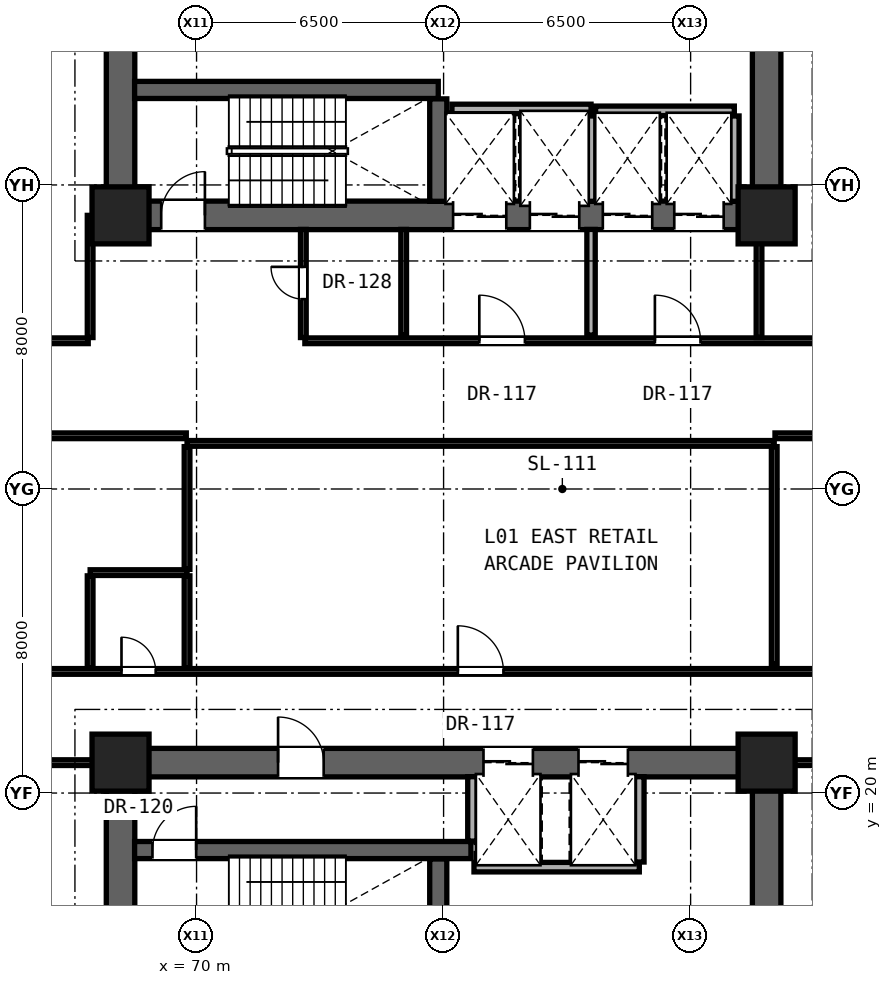
"""IFC4 building model, lengths in metres.
Left out: names, types, materials, properties, quantities, classifications, styles, units other than length and angle.
Written with IfcOpenShell. Run it as: python <this file> out.ifc"""

import sys

from ifc_helpers import new_model, si_unit, direction, frame, frame_2d, origin, origin_2d, place, context, subcontext, project, spatial, rectangle, extrude, element, fill, save


model = new_model("IFC4")
c1 = context("Model", 3, precision=1e-05, world=origin(), true_north=direction((0.0, 1.0)))
c2 = subcontext(c1, "Body", "Model", "MODEL_VIEW")
j1 = project(units=[si_unit("LENGTHUNIT", "METRE"), si_unit("PLANEANGLEUNIT", "RADIAN")], contexts=[c1])
p1 = place(None, origin())
s1 = spatial("IfcSite", under=j1, at=p1, CompositionType="ELEMENT")
p2 = place(p1, origin())
s2 = spatial("IfcBuilding", under=s1, at=p2, CompositionType="ELEMENT")
p3 = place(p2, frame((0.0, 0.0, 5.2)))
s3 = spatial("IfcBuildingStorey", under=s2, at=p3, CompositionType="ELEMENT", Elevation=5.2)
for number, where, z_axis, x_axis in (
    (1, (68.0, 20.8, 0.0), (0.0, 0.0, 1.0), (1.0, 0.0, 0.0)),
    (2, (85.0, 20.8, 0.0), (0.0, 0.0, 1.0), (1.0, 0.0, 0.0)),
    (3, (68.0, 35.2, 0.0), (0.0, 0.0, 1.0), (1.0, 0.0, 0.0)),
    (4, (85.0, 35.2, 0.0), (0.0, 0.0, 1.0), (1.0, 0.0, 0.0)),
):
    element("IfcColumn", number, at=place(p3, frame(where, z_axis=z_axis, x_axis=x_axis)), inside=s3, PredefinedType="COLUMN", context=c2, shape_type="SweptSolid", body=[
        extrude(rectangle(XDim=1.5, YDim=1.5, at=origin_2d()), origin(), (0.0, 0.0, 1.0), 4.3),
    ])
for number, where, z_axis, x_axis in (
    (5, (68.0, 35.2, 0.0), (0.0, 0.0, 1.0), (0.0, 1.0, 0.0)),
    (6, (85.0, 35.2, 0.0), (0.0, 0.0, 1.0), (0.0, 1.0, 0.0)),
):
    element("IfcWall", number, at=place(p3, frame(where, z_axis=z_axis, x_axis=x_axis)), inside=s3, PredefinedType="SHEAR", context=c2, shape_type="SweptSolid", body=[
        extrude(rectangle(XDim=5.6, YDim=0.75, at=frame_2d((2.8, 0.0))), origin(), (0.0, 0.0, 1.0), 3.98),
    ])
p4 = place(p3, frame((68.0, 35.2, 0.0), z_axis=(0.0, 0.0, 1.0), x_axis=(1.0, 0.0, 0.0)))
e7 = element("IfcWall", 7, at=p4, inside=s3, PredefinedType="SHEAR", context=c2, shape_type="SweptSolid", body=[
    extrude(rectangle(XDim=17.0, YDim=0.75, at=frame_2d((8.5, 0.0))), origin(), (0.0, 0.0, 1.0), 3.98),
])
p5 = place(p4, frame((1.07, 0.0, 0.0)))
e8 = element("IfcOpeningElement", 8, at=p5, cuts=e7, PredefinedType="OPENING", context=c2, shape_type="SweptSolid", body=[
    extrude(rectangle(XDim=1.15, YDim=2.2, at=frame_2d((0.575, 1.1))), frame((0.0, 0.385, 0.0), z_axis=(0.0, -1.0, 0.0), x_axis=(1.0, 0.0, 0.0)), (0.0, 0.0, 1.0), 0.77),
])
p6 = place(p4, frame((8.75, 0.0, 0.0)))
e9 = element("IfcOpeningElement", 9, at=p6, cuts=e7, PredefinedType="OPENING", context=c2, shape_type="SweptSolid", body=[
    extrude(rectangle(XDim=1.4, YDim=2.35, at=frame_2d((0.7, 1.175))), frame((0.0, 0.385, 0.0), z_axis=(0.0, -1.0, 0.0), x_axis=(1.0, 0.0, 0.0)), (0.0, 0.0, 1.0), 0.77),
])
p7 = place(p4, frame((10.77, 0.0, 0.0)))
e10 = element("IfcOpeningElement", 10, at=p7, cuts=e7, PredefinedType="OPENING", context=c2, shape_type="SweptSolid", body=[
    extrude(rectangle(XDim=1.3, YDim=2.3, at=frame_2d((0.65, 1.15))), frame((0.0, 0.385, 0.0), z_axis=(0.0, -1.0, 0.0), x_axis=(1.0, 0.0, 0.0)), (0.0, 0.0, 1.0), 0.77),
])
p8 = place(p4, frame((12.69, 0.0, 0.0)))
e11 = element("IfcOpeningElement", 11, at=p8, cuts=e7, PredefinedType="OPENING", context=c2, shape_type="SweptSolid", body=[
    extrude(rectangle(XDim=1.3, YDim=2.3, at=frame_2d((0.65, 1.15))), frame((0.0, 0.385, 0.0), z_axis=(0.0, -1.0, 0.0), x_axis=(1.0, 0.0, 0.0)), (0.0, 0.0, 1.0), 0.77),
])
p9 = place(p4, frame((14.57, 0.0, 0.0)))
e12 = element("IfcOpeningElement", 12, at=p9, cuts=e7, PredefinedType="OPENING", context=c2, shape_type="SweptSolid", body=[
    extrude(rectangle(XDim=1.3, YDim=2.3, at=frame_2d((0.65, 1.15))), frame((0.0, 0.385, 0.0), z_axis=(0.0, -1.0, 0.0), x_axis=(1.0, 0.0, 0.0)), (0.0, 0.0, 1.0), 0.77),
])
for number, where, z_axis, x_axis in (
    (13, (68.0, 15.2, 0.0), (0.0, 0.0, 1.0), (0.0, 1.0, 0.0)),
    (14, (85.0, 15.2, 0.0), (0.0, 0.0, 1.0), (0.0, 1.0, 0.0)),
):
    element("IfcWall", number, at=place(p3, frame(where, z_axis=z_axis, x_axis=x_axis)), inside=s3, PredefinedType="SHEAR", context=c2, shape_type="SweptSolid", body=[
        extrude(rectangle(XDim=5.6, YDim=0.75, at=frame_2d((2.8, 0.0))), origin(), (0.0, 0.0, 1.0), 3.98),
    ])
p10 = place(p3, frame((68.0, 20.8, 0.0), z_axis=(0.0, 0.0, 1.0), x_axis=(1.0, 0.0, 0.0)))
e15 = element("IfcWall", 15, at=p10, inside=s3, PredefinedType="SHEAR", context=c2, shape_type="SweptSolid", body=[
    extrude(rectangle(XDim=17.0, YDim=0.75, at=frame_2d((8.5, 0.0))), origin(), (0.0, 0.0, 1.0), 3.98),
])
p11 = place(p10, frame((4.145, 0.0, 0.0)))
e16 = element("IfcOpeningElement", 16, at=p11, cuts=e15, PredefinedType="OPENING", context=c2, shape_type="SweptSolid", body=[
    extrude(rectangle(XDim=1.2, YDim=2.25, at=frame_2d((0.6, 1.125))), frame((0.0, 0.385, 0.0), z_axis=(0.0, -1.0, 0.0), x_axis=(1.0, 0.0, 0.0)), (0.0, 0.0, 1.0), 0.77),
])
p12 = place(p10, frame((9.55, 0.0, 0.0)))
e17 = element("IfcOpeningElement", 17, at=p12, cuts=e15, PredefinedType="OPENING", context=c2, shape_type="SweptSolid", body=[
    extrude(rectangle(XDim=1.3, YDim=2.3, at=frame_2d((0.65, 1.15))), frame((0.0, 0.385, 0.0), z_axis=(0.0, -1.0, 0.0), x_axis=(1.0, 0.0, 0.0)), (0.0, 0.0, 1.0), 0.77),
])
p13 = place(p10, frame((12.05, 0.0, 0.0)))
e18 = element("IfcOpeningElement", 18, at=p13, cuts=e15, PredefinedType="OPENING", context=c2, shape_type="SweptSolid", body=[
    extrude(rectangle(XDim=1.3, YDim=2.3, at=frame_2d((0.65, 1.15))), frame((0.0, 0.385, 0.0), z_axis=(0.0, -1.0, 0.0), x_axis=(1.0, 0.0, 0.0)), (0.0, 0.0, 1.0), 0.77),
])
p14 = place(p3, frame((77.3, 18.05, 0.0), z_axis=(0.0, 0.0, 1.0), x_axis=(1.0, 0.0, 0.0)))
e19 = element("IfcWall", 19, at=p14, inside=s3, PredefinedType="SOLIDWALL", context=c2, shape_type="SweptSolid", body=[
    extrude(rectangle(XDim=4.35, YDim=0.25, at=frame_2d((2.175, 0.0))), origin(), (0.0, 0.0, 1.0), 3.98),
])
p15 = place(p3, frame((68.37, 18.5, 0.0), z_axis=(0.0, 0.0, 1.0), x_axis=(1.0, 0.0, 0.0)))
e20 = element("IfcWall", 20, at=p15, inside=s3, PredefinedType="SHEAR", context=c2, shape_type="SweptSolid", body=[
    extrude(rectangle(XDim=8.85, YDim=0.45, at=frame_2d((4.425, 0.0))), origin(), (0.0, 0.0, 1.0), 3.98),
])
p16 = place(p15, frame((0.47, 0.0, 0.0)))
e21 = element("IfcOpeningElement", 21, at=p16, cuts=e20, PredefinedType="OPENING", context=c2, shape_type="SweptSolid", body=[
    extrude(rectangle(XDim=1.15, YDim=2.2, at=frame_2d((0.575, 1.1))), frame((0.0, 0.235, 0.0), z_axis=(0.0, -1.0, 0.0), x_axis=(1.0, 0.0, 0.0)), (0.0, 0.0, 1.0), 0.47),
])
p17 = place(p3, frame((61.8, 20.8, 0.0), z_axis=(0.0, 0.0, 1.0), x_axis=(1.0, 0.0, 0.0)))
e22 = element("IfcWall", 22, at=p17, inside=s3, PredefinedType="PARTITIONING", context=c2, shape_type="SweptSolid", body=[
    extrude(rectangle(XDim=5.83, YDim=0.15, at=frame_2d((2.915, 0.0))), origin(), (0.0, 0.0, 1.0), 2.872),
])
p18 = place(p3, frame((85.37, 20.8, 0.0), z_axis=(0.0, 0.0, 1.0), x_axis=(1.0, 0.0, 0.0)))
e23 = element("IfcWall", 23, at=p18, inside=s3, PredefinedType="PARTITIONING", context=c2, shape_type="SweptSolid", body=[
    extrude(rectangle(XDim=5.58, YDim=0.15, at=frame_2d((2.79, 0.0))), origin(), (0.0, 0.0, 1.0), 2.872),
])
p19 = place(p3, frame((61.8, 23.2, 0.0), z_axis=(0.0, 0.0, 1.0), x_axis=(1.0, 0.0, 0.0)))
e24 = element("IfcWall", 24, at=p19, inside=s3, PredefinedType="PARTITIONING", context=c2, shape_type="SweptSolid", body=[
    extrude(rectangle(XDim=29.15, YDim=0.15, at=frame_2d((14.575, 0.0))), origin(), (0.0, 0.0, 1.0), 3.045),
])
p20 = place(p19, frame((6.225, 0.0, 0.0)))
e25 = element("IfcOpeningElement", 25, at=p20, cuts=e24, PredefinedType="OPENING", context=c2, shape_type="SweptSolid", body=[
    extrude(rectangle(XDim=0.9, YDim=2.1, at=frame_2d((0.45, 1.05))), frame((0.0, 0.085, 0.0), z_axis=(0.0, -1.0, 0.0), x_axis=(1.0, 0.0, 0.0)), (0.0, 0.0, 1.0), 0.17),
])
p21 = place(p19, frame((15.075, 0.0, 0.0)))
e26 = element("IfcOpeningElement", 26, at=p21, cuts=e24, PredefinedType="OPENING", context=c2, shape_type="SweptSolid", body=[
    extrude(rectangle(XDim=1.2, YDim=2.25, at=frame_2d((0.6, 1.125))), frame((0.0, 0.085, 0.0), z_axis=(0.0, -1.0, 0.0), x_axis=(1.0, 0.0, 0.0)), (0.0, 0.0, 1.0), 0.17),
])
p22 = place(p3, frame((67.2, 25.8, 0.0), z_axis=(0.0, 0.0, 1.0), x_axis=(1.0, 0.0, 0.0)))
e27 = element("IfcWall", 27, at=p22, inside=s3, PredefinedType="PARTITIONING", context=c2, shape_type="SweptSolid", body=[
    extrude(rectangle(XDim=2.55, YDim=0.15, at=frame_2d((1.275, 0.0))), origin(), (0.0, 0.0, 1.0), 3.045),
])
p23 = place(p3, frame((69.75, 29.2, 0.0), z_axis=(0.0, 0.0, 1.0), x_axis=(1.0, 0.0, 0.0)))
e28 = element("IfcWall", 28, at=p23, inside=s3, PredefinedType="PARTITIONING", context=c2, shape_type="SweptSolid", body=[
    extrude(rectangle(XDim=15.45, YDim=0.15, at=frame_2d((7.725, 0.0))), origin(), (0.0, 0.0, 1.0), 3.045),
])
p24 = place(p3, frame((61.8, 29.4, 0.0), z_axis=(0.0, 0.0, 1.0), x_axis=(1.0, 0.0, 0.0)))
e29 = element("IfcWall", 29, at=p24, inside=s3, PredefinedType="PARTITIONING", context=c2, shape_type="SweptSolid", body=[
    extrude(rectangle(XDim=7.93, YDim=0.15, at=frame_2d((3.965, 0.0))), origin(), (0.0, 0.0, 1.0), 3.045),
])
p25 = place(p3, frame((85.22, 29.4, 0.0), z_axis=(0.0, 0.0, 1.0), x_axis=(1.0, 0.0, 0.0)))
e30 = element("IfcWall", 30, at=p25, inside=s3, PredefinedType="PARTITIONING", context=c2, shape_type="SweptSolid", body=[
    extrude(rectangle(XDim=5.73, YDim=0.15, at=frame_2d((2.865, 0.0))), origin(), (0.0, 0.0, 1.0), 3.116),
])
p26 = place(p3, frame((61.8, 31.9, 0.0), z_axis=(0.0, 0.0, 1.0), x_axis=(1.0, 0.0, 0.0)))
e31 = element("IfcWall", 31, at=p26, inside=s3, PredefinedType="PARTITIONING", context=c2, shape_type="SweptSolid", body=[
    extrude(rectangle(XDim=5.35, YDim=0.15, at=frame_2d((2.675, 0.0))), origin(), (0.0, 0.0, 1.0), 3.98),
])
p27 = place(p3, frame((72.85, 31.9, 0.0), z_axis=(0.0, 0.0, 1.0), x_axis=(1.0, 0.0, 0.0)))
e32 = element("IfcWall", 32, at=p27, inside=s3, PredefinedType="PARTITIONING", context=c2, shape_type="SweptSolid", body=[
    extrude(rectangle(XDim=18.1, YDim=0.15, at=frame_2d((9.05, 0.0))), origin(), (0.0, 0.0, 1.0), 3.045),
])
p28 = place(p27, frame((9.21, 0.0, 0.0)))
e33 = element("IfcOpeningElement", 33, at=p28, cuts=e32, PredefinedType="OPENING", context=c2, shape_type="SweptSolid", body=[
    extrude(rectangle(XDim=1.2, YDim=2.25, at=frame_2d((0.6, 1.125))), frame((0.0, 0.085, 0.0), z_axis=(0.0, -1.0, 0.0), x_axis=(1.0, 0.0, 0.0)), (0.0, 0.0, 1.0), 0.17),
])
p29 = place(p27, frame((4.59, 0.0, 0.0)))
e34 = element("IfcOpeningElement", 34, at=p29, cuts=e32, PredefinedType="OPENING", context=c2, shape_type="SweptSolid", body=[
    extrude(rectangle(XDim=1.2, YDim=2.25, at=frame_2d((0.6, 1.125))), frame((0.0, 0.085, 0.0), z_axis=(0.0, -1.0, 0.0), x_axis=(1.0, 0.0, 0.0)), (0.0, 0.0, 1.0), 0.17),
])
p30 = place(p3, frame((80.5, 37.95, 0.0), z_axis=(0.0, 0.0, 1.0), x_axis=(1.0, 0.0, 0.0)))
e35 = element("IfcWall", 35, at=p30, inside=s3, PredefinedType="SOLIDWALL", context=c2, shape_type="SweptSolid", body=[
    extrude(rectangle(XDim=3.65, YDim=0.25, at=frame_2d((1.825, 0.0))), origin(), (0.0, 0.0, 1.0), 3.98),
])
p31 = place(p3, frame((76.72, 38.0, 0.0), z_axis=(0.0, 0.0, 1.0), x_axis=(1.0, 0.0, 0.0)))
e36 = element("IfcWall", 36, at=p31, inside=s3, PredefinedType="SOLIDWALL", context=c2, shape_type="SweptSolid", body=[
    extrude(rectangle(XDim=3.66, YDim=0.25, at=frame_2d((1.83, 0.0))), origin(), (0.0, 0.0, 1.0), 3.98),
])
p32 = place(p3, frame((68.37, 38.5, 0.0), z_axis=(0.0, 0.0, 1.0), x_axis=(1.0, 0.0, 0.0)))
e37 = element("IfcWall", 37, at=p32, inside=s3, PredefinedType="SHEAR", context=c2, shape_type="SweptSolid", body=[
    extrude(rectangle(XDim=7.99, YDim=0.45, at=frame_2d((3.995, 0.0))), origin(), (0.0, 0.0, 1.0), 3.98),
])
p33 = place(p3, frame((67.2, 23.285, 0.0), z_axis=(0.0, 0.0, 1.0), x_axis=(0.0, 1.0, 0.0)))
e38 = element("IfcWall", 38, at=p33, inside=s3, PredefinedType="PARTITIONING", context=c2, shape_type="SweptSolid", body=[
    extrude(rectangle(XDim=2.43, YDim=0.15, at=frame_2d((1.215, 0.0))), origin(), (0.0, 0.0, 1.0), 3.98),
])
p34 = place(p3, frame((67.2, 31.985, 0.0), z_axis=(0.0, 0.0, 1.0), x_axis=(0.0, 1.0, 0.0)))
e39 = element("IfcWall", 39, at=p34, inside=s3, PredefinedType="PARTITIONING", context=c2, shape_type="SweptSolid", body=[
    extrude(rectangle(XDim=3.215, YDim=0.15, at=frame_2d((1.607, 0.0))), origin(), (0.0, 0.0, 1.0), 2.872),
])
p35 = place(p3, frame((69.75, 23.285, 0.0), z_axis=(0.0, 0.0, 1.0), x_axis=(0.0, 1.0, 0.0)))
e40 = element("IfcWall", 40, at=p35, inside=s3, PredefinedType="PARTITIONING", context=c2, shape_type="SweptSolid", body=[
    extrude(rectangle(XDim=2.43, YDim=0.15, at=frame_2d((1.215, 0.0))), origin(), (0.0, 0.0, 1.0), 3.98),
])
p36 = place(p3, frame((69.75, 25.885, 0.0), z_axis=(0.0, 0.0, 1.0), x_axis=(0.0, 1.0, 0.0)))
e41 = element("IfcWall", 41, at=p36, inside=s3, PredefinedType="PARTITIONING", context=c2, shape_type="SweptSolid", body=[
    extrude(rectangle(XDim=3.23, YDim=0.15, at=frame_2d((1.615, 0.0))), origin(), (0.0, 0.0, 1.0), 3.045),
])
p37 = place(p3, frame((72.81, 31.985, 0.0), z_axis=(0.0, 0.0, 1.0), x_axis=(0.0, 1.0, 0.0)))
e42 = element("IfcWall", 42, at=p37, inside=s3, PredefinedType="PARTITIONING", context=c2, shape_type="SweptSolid", body=[
    extrude(rectangle(XDim=2.845, YDim=0.15, at=frame_2d((1.422, 0.0))), origin(), (0.0, 0.0, 1.0), 3.98),
])
p38 = place(p37, frame((1.01, 0.0, 0.0)))
e43 = element("IfcOpeningElement", 43, at=p38, cuts=e42, PredefinedType="OPENING", context=c2, shape_type="SweptSolid", body=[
    extrude(rectangle(XDim=0.85, YDim=2.01, at=frame_2d((0.425, 1.005))), frame((0.0, 0.085, 0.0), z_axis=(0.0, -1.0, 0.0), x_axis=(1.0, 0.0, 0.0)), (0.0, 0.0, 1.0), 0.17),
])
p39 = place(p3, frame((75.45, 32.05, 0.0), z_axis=(0.0, 0.0, 1.0), x_axis=(0.0, 1.0, 0.0)))
e44 = element("IfcWall", 44, at=p39, inside=s3, PredefinedType="PARTITIONING", context=c2, shape_type="SweptSolid", body=[
    extrude(rectangle(XDim=2.78, YDim=0.15, at=frame_2d((1.39, 0.0))), origin(), (0.0, 0.0, 1.0), 3.98),
])
p40 = place(p3, frame((76.36, 15.965, 0.0), z_axis=(0.0, 0.0, 1.0), x_axis=(0.0, 1.0, 0.0)))
e45 = element("IfcWall", 45, at=p40, inside=s3, PredefinedType="SHEAR", context=c2, shape_type="SweptSolid", body=[
    extrude(rectangle(XDim=2.3, YDim=0.45, at=frame_2d((1.15, 0.0))), origin(), (0.0, 0.0, 1.0), 3.98),
])
p41 = place(p3, frame((76.36, 35.57, 0.0), z_axis=(0.0, 0.0, 1.0), x_axis=(0.0, 1.0, 0.0)))
e46 = element("IfcWall", 46, at=p41, inside=s3, PredefinedType="SHEAR", context=c2, shape_type="SweptSolid", body=[
    extrude(rectangle(XDim=2.695, YDim=0.45, at=frame_2d((1.347, 0.0))), origin(), (0.0, 0.0, 1.0), 3.98),
])
p42 = place(p3, frame((77.26, 18.735, 0.0), z_axis=(0.0, 0.0, 1.0), x_axis=(0.0, 1.0, 0.0)))
e47 = element("IfcWall", 47, at=p42, inside=s3, PredefinedType="SOLIDWALL", context=c2, shape_type="SweptSolid", body=[
    extrude(rectangle(XDim=1.695, YDim=0.25, at=frame_2d((0.847, 0.0))), origin(), (0.0, 0.0, 1.0), 3.98),
])
p43 = place(p3, frame((80.38, 32.05, 0.0), z_axis=(0.0, 0.0, 1.0), x_axis=(0.0, 1.0, 0.0)))
e48 = element("IfcWall", 48, at=p43, inside=s3, PredefinedType="SOLIDWALL", context=c2, shape_type="SweptSolid", body=[
    extrude(rectangle(XDim=2.78, YDim=0.22, at=frame_2d((1.39, 0.0))), origin(), (0.0, 0.0, 1.0), 3.98),
])
for number, where, z_axis, x_axis in (
    (49, (80.38, 35.57, 0.0), (0.0, 0.0, 1.0), (0.0, 1.0, 0.0)),
    (50, (81.65, 18.185, 0.0), (0.0, 0.0, 1.0), (0.0, 1.0, 0.0)),
    (51, (84.15, 35.57, 0.0), (0.0, 0.0, 1.0), (0.0, 1.0, 0.0)),
):
    element("IfcWall", number, at=place(p3, frame(where, z_axis=z_axis, x_axis=x_axis)), inside=s3, PredefinedType="SOLIDWALL", context=c2, shape_type="SweptSolid", body=[
        extrude(rectangle(XDim=2.245, YDim=0.25, at=frame_2d((1.123, 0.0))), origin(), (0.0, 0.0, 1.0), 3.98),
    ])
p44 = place(p3, frame((84.8, 31.985, 0.0), z_axis=(0.0, 0.0, 1.0), x_axis=(0.0, 1.0, 0.0)))
e52 = element("IfcWall", 52, at=p44, inside=s3, PredefinedType="PARTITIONING", context=c2, shape_type="SweptSolid", body=[
    extrude(rectangle(XDim=2.845, YDim=0.15, at=frame_2d((1.422, 0.0))), origin(), (0.0, 0.0, 1.0), 3.045),
])
p45 = place(p3, frame((85.2, 23.4, 0.0), z_axis=(0.0, 0.0, 1.0), x_axis=(0.0, 1.0, 0.0)))
e53 = element("IfcWall", 53, at=p45, inside=s3, PredefinedType="PARTITIONING", context=c2, shape_type="SweptSolid", body=[
    extrude(rectangle(XDim=5.715, YDim=0.15, at=frame_2d((2.857, 0.0))), origin(), (0.0, 0.0, 1.0), 3.045),
])
p46 = place(p28, origin())
e54 = element("IfcDoor", 54, at=p46, inside=s3, OperationType="SINGLE_SWING_LEFT", PredefinedType="DOOR", context=c2, shape_type="SweptSolid", body=[
    extrude(rectangle(XDim=1.2, YDim=2.25, at=frame_2d((0.6, 1.125))), frame((0.0, 0.025, 0.0), z_axis=(0.0, -1.0, 0.0), x_axis=(1.0, 0.0, 0.0)), (0.0, 0.0, 1.0), 0.05),
])
fill(e33, e54)
p47 = place(p5, origin())
e55 = element("IfcDoor", 55, at=p47, inside=s3, OperationType="SINGLE_SWING_RIGHT", PredefinedType="DOOR", context=c2, shape_type="SweptSolid", body=[
    extrude(rectangle(XDim=1.15, YDim=2.2, at=frame_2d((0.575, 1.1))), frame((0.0, 0.025, 0.0), z_axis=(0.0, -1.0, 0.0), x_axis=(1.0, 0.0, 0.0)), (0.0, 0.0, 1.0), 0.05),
])
fill(e8, e55)
p48 = place(p29, origin())
e56 = element("IfcDoor", 56, at=p48, inside=s3, OperationType="SINGLE_SWING_LEFT", PredefinedType="DOOR", context=c2, shape_type="SweptSolid", body=[
    extrude(rectangle(XDim=1.2, YDim=2.25, at=frame_2d((0.6, 1.125))), frame((0.0, 0.025, 0.0), z_axis=(0.0, -1.0, 0.0), x_axis=(1.0, 0.0, 0.0)), (0.0, 0.0, 1.0), 0.05),
])
fill(e34, e56)
p49 = place(p38, origin())
e57 = element("IfcDoor", 57, at=p49, inside=s3, OperationType="SINGLE_SWING_RIGHT", PredefinedType="DOOR", context=c2, shape_type="SweptSolid", body=[
    extrude(rectangle(XDim=0.85, YDim=2.01, at=frame_2d((0.425, 1.005))), frame((0.0, 0.025, 0.0), z_axis=(0.0, -1.0, 0.0), x_axis=(1.0, 0.0, 0.0)), (0.0, 0.0, 1.0), 0.05),
])
fill(e43, e57)
p50 = place(p11, origin())
e58 = element("IfcDoor", 58, at=p50, inside=s3, OperationType="SINGLE_SWING_LEFT", PredefinedType="DOOR", context=c2, shape_type="SweptSolid", body=[
    extrude(rectangle(XDim=1.2, YDim=2.25, at=frame_2d((0.6, 1.125))), frame((0.0, 0.025, 0.0), z_axis=(0.0, -1.0, 0.0), x_axis=(1.0, 0.0, 0.0)), (0.0, 0.0, 1.0), 0.05),
])
fill(e16, e58)
p51 = place(p16, origin())
e59 = element("IfcDoor", 59, at=p51, inside=s3, OperationType="SINGLE_SWING_RIGHT", PredefinedType="DOOR", context=c2, shape_type="SweptSolid", body=[
    extrude(rectangle(XDim=1.15, YDim=2.2, at=frame_2d((0.575, 1.1))), frame((0.0, 0.025, 0.0), z_axis=(0.0, -1.0, 0.0), x_axis=(1.0, 0.0, 0.0)), (0.0, 0.0, 1.0), 0.05),
])
fill(e21, e59)
p52 = place(p20, origin())
e60 = element("IfcDoor", 60, at=p52, inside=s3, OperationType="SINGLE_SWING_LEFT", PredefinedType="DOOR", context=c2, shape_type="SweptSolid", body=[
    extrude(rectangle(XDim=0.9, YDim=2.1, at=frame_2d((0.45, 1.05))), frame((0.0, 0.025, 0.0), z_axis=(0.0, -1.0, 0.0), x_axis=(1.0, 0.0, 0.0)), (0.0, 0.0, 1.0), 0.05),
])
fill(e25, e60)
p53 = place(p21, origin())
e61 = element("IfcDoor", 61, at=p53, inside=s3, OperationType="SINGLE_SWING_LEFT", PredefinedType="DOOR", context=c2, shape_type="SweptSolid", body=[
    extrude(rectangle(XDim=1.2, YDim=2.25, at=frame_2d((0.6, 1.125))), frame((0.0, 0.025, 0.0), z_axis=(0.0, -1.0, 0.0), x_axis=(1.0, 0.0, 0.0)), (0.0, 0.0, 1.0), 0.05),
])
fill(e26, e61)
p54 = place(p6, origin())
e62 = element("IfcDoor", 62, at=p54, inside=s3, OperationType="DOUBLE_DOOR_SLIDING", PredefinedType="DOOR", context=c2, shape_type="SweptSolid", body=[
    extrude(rectangle(XDim=1.4, YDim=2.35, at=frame_2d((0.7, 1.175))), frame((0.0, 0.025, 0.0), z_axis=(0.0, -1.0, 0.0), x_axis=(1.0, 0.0, 0.0)), (0.0, 0.0, 1.0), 0.05),
])
fill(e9, e62)
p55 = place(p7, origin())
e63 = element("IfcDoor", 63, at=p55, inside=s3, OperationType="DOUBLE_DOOR_SLIDING", PredefinedType="DOOR", context=c2, shape_type="SweptSolid", body=[
    extrude(rectangle(XDim=1.3, YDim=2.3, at=frame_2d((0.65, 1.15))), frame((0.0, 0.025, 0.0), z_axis=(0.0, -1.0, 0.0), x_axis=(1.0, 0.0, 0.0)), (0.0, 0.0, 1.0), 0.05),
])
fill(e10, e63)
p56 = place(p8, origin())
e64 = element("IfcDoor", 64, at=p56, inside=s3, OperationType="DOUBLE_DOOR_SLIDING", PredefinedType="DOOR", context=c2, shape_type="SweptSolid", body=[
    extrude(rectangle(XDim=1.3, YDim=2.3, at=frame_2d((0.65, 1.15))), frame((0.0, 0.025, 0.0), z_axis=(0.0, -1.0, 0.0), x_axis=(1.0, 0.0, 0.0)), (0.0, 0.0, 1.0), 0.05),
])
fill(e11, e64)
p57 = place(p9, origin())
e65 = element("IfcDoor", 65, at=p57, inside=s3, OperationType="DOUBLE_DOOR_SLIDING", PredefinedType="DOOR", context=c2, shape_type="SweptSolid", body=[
    extrude(rectangle(XDim=1.3, YDim=2.3, at=frame_2d((0.65, 1.15))), frame((0.0, 0.025, 0.0), z_axis=(0.0, -1.0, 0.0), x_axis=(1.0, 0.0, 0.0)), (0.0, 0.0, 1.0), 0.05),
])
fill(e12, e65)
p58 = place(p12, origin())
e66 = element("IfcDoor", 66, at=p58, inside=s3, OperationType="DOUBLE_DOOR_SLIDING", PredefinedType="DOOR", context=c2, shape_type="SweptSolid", body=[
    extrude(rectangle(XDim=1.3, YDim=2.3, at=frame_2d((0.65, 1.15))), frame((0.0, 0.025, 0.0), z_axis=(0.0, -1.0, 0.0), x_axis=(1.0, 0.0, 0.0)), (0.0, 0.0, 1.0), 0.05),
])
fill(e17, e66)
p59 = place(p13, origin())
e67 = element("IfcDoor", 67, at=p59, inside=s3, OperationType="DOUBLE_DOOR_SLIDING", PredefinedType="DOOR", context=c2, shape_type="SweptSolid", body=[
    extrude(rectangle(XDim=1.3, YDim=2.3, at=frame_2d((0.65, 1.15))), frame((0.0, 0.025, 0.0), z_axis=(0.0, -1.0, 0.0), x_axis=(1.0, 0.0, 0.0)), (0.0, 0.0, 1.0), 0.05),
])
fill(e18, e67)
save(model, sys.argv[1])
